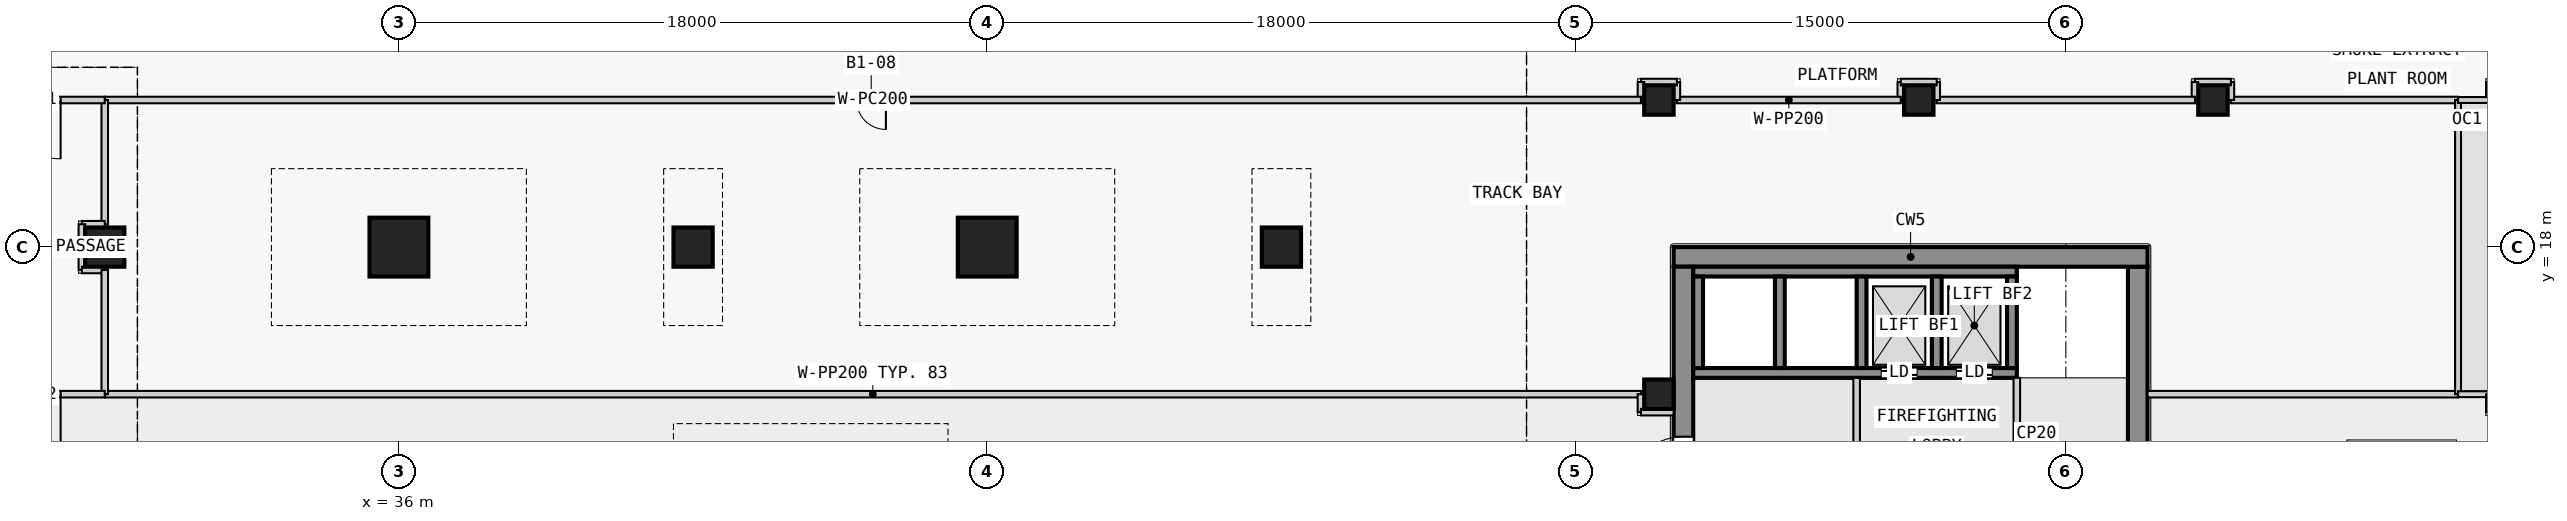
"""IFC4 building model, lengths in metres.
Left out: names, types, materials, properties, quantities, classifications, styles, units other than length and angle.
Written with IfcOpenShell. Run it as: python <this file> out.ifc"""

import sys

from ifc_helpers import new_model, si_unit, direction, frame, frame_2d, origin, origin_2d, place, context, subcontext, project, spatial, rectangle, extrude, element, fill, save


model = new_model("IFC4")
c1 = context("Model", 3, precision=1e-05, world=origin(), true_north=direction((0.0, 1.0)))
c2 = subcontext(c1, "Body", "Model", "MODEL_VIEW")
j1 = project(units=[si_unit("LENGTHUNIT", "METRE"), si_unit("PLANEANGLEUNIT", "RADIAN")], contexts=[c1])
p1 = place(None, origin())
s1 = spatial("IfcSite", under=j1, at=p1, CompositionType="ELEMENT")
p2 = place(p1, origin())
s2 = spatial("IfcBuilding", under=s1, at=p2, CompositionType="ELEMENT")
p3 = place(p2, frame((0.0, 0.0, -7.0)))
s3 = spatial("IfcBuildingStorey", under=s2, at=p3, CompositionType="ELEMENT", Elevation=-7.0)
p4 = place(p3, frame((27.0, 18.0, 0.0), z_axis=(0.0, 0.0, 1.0), x_axis=(1.0, 0.0, 0.0)))
e1 = element("IfcColumn", 1, at=p4, inside=s3, PredefinedType="COLUMN", context=c2, shape_type="SweptSolid", body=[
    extrude(rectangle(XDim=1.2, YDim=1.2, at=origin_2d()), origin(), (0.0, 0.0, 1.0), 7.0),
])
p5 = place(p3, frame((36.0, 18.0, 0.0), z_axis=(0.0, 0.0, 1.0), x_axis=(1.0, 0.0, 0.0)))
e2 = element("IfcColumn", 2, at=p5, inside=s3, PredefinedType="COLUMN", context=c2, shape_type="SweptSolid", body=[
    extrude(rectangle(XDim=1.8, YDim=1.8, at=origin_2d()), origin(), (0.0, 0.0, 1.0), 7.0),
])
p6 = place(p3, frame((45.0, 18.0, 0.0), z_axis=(0.0, 0.0, 1.0), x_axis=(1.0, 0.0, 0.0)))
e3 = element("IfcColumn", 3, at=p6, inside=s3, PredefinedType="COLUMN", context=c2, shape_type="SweptSolid", body=[
    extrude(rectangle(XDim=1.2, YDim=1.2, at=origin_2d()), origin(), (0.0, 0.0, 1.0), 7.0),
])
p7 = place(p3, frame((54.0, 18.0, 0.0), z_axis=(0.0, 0.0, 1.0), x_axis=(1.0, 0.0, 0.0)))
e4 = element("IfcColumn", 4, at=p7, inside=s3, PredefinedType="COLUMN", context=c2, shape_type="SweptSolid", body=[
    extrude(rectangle(XDim=1.8, YDim=1.8, at=origin_2d()), origin(), (0.0, 0.0, 1.0), 7.0),
])
p8 = place(p3, frame((63.0, 18.0, 0.0), z_axis=(0.0, 0.0, 1.0), x_axis=(1.0, 0.0, 0.0)))
e5 = element("IfcColumn", 5, at=p8, inside=s3, PredefinedType="COLUMN", context=c2, shape_type="SweptSolid", body=[
    extrude(rectangle(XDim=1.2, YDim=1.2, at=origin_2d()), origin(), (0.0, 0.0, 1.0), 7.0),
])
for number, where, z_axis, x_axis in (
    (6, (91.5, 22.5, 0.0), (0.0, 0.0, 1.0), (1.0, 0.0, 0.0)),
    (7, (82.5, 22.5, 0.0), (0.0, 0.0, 1.0), (1.0, 0.0, 0.0)),
    (8, (74.55, 22.5, 0.0), (0.0, 0.0, 1.0), (1.0, 0.0, 0.0)),
    (9, (74.55, 13.5, 0.0), (0.0, 0.0, 1.0), (1.0, 0.0, 0.0)),
):
    element("IfcColumn", number, at=place(p3, frame(where, z_axis=z_axis, x_axis=x_axis)), inside=s3, PredefinedType="COLUMN", context=c2, shape_type="SweptSolid", body=[
        extrude(rectangle(XDim=0.9, YDim=0.9, at=origin_2d()), origin(), (0.0, 0.0, 1.0), 7.0),
    ])
p9 = place(p3, frame((75.0, 17.7, 0.0), z_axis=(0.0, 0.0, 1.0), x_axis=(1.0, 0.0, 0.0)))
e10 = element("IfcWall", 10, at=p9, inside=s3, PredefinedType="SHEAR", context=c2, shape_type="SweptSolid", body=[
    extrude(rectangle(XDim=14.5, YDim=0.6, at=frame_2d((7.25, 0.0))), origin(), (0.0, 0.0, 1.0), 6.55),
])
p10 = place(p3, frame((75.3, 0.6, 0.0), z_axis=(0.0, 0.0, 1.0), x_axis=(0.0, 1.0, 0.0)))
e11 = element("IfcWall", 11, at=p10, inside=s3, PredefinedType="SHEAR", context=c2, shape_type="SweptSolid", body=[
    extrude(rectangle(XDim=16.8, YDim=0.6, at=frame_2d((8.4, 0.0))), origin(), (0.0, 0.0, 1.0), 6.55),
])
p11 = place(p10, frame((9.8, 0.0, 0.0)))
e12 = element("IfcOpeningElement", 12, at=p11, cuts=e11, PredefinedType="OPENING", context=c2, shape_type="SweptSolid", body=[
    extrude(rectangle(XDim=1.8, YDim=2.1, at=frame_2d((0.9, 1.05))), frame((0.0, 0.31, 0.0), z_axis=(0.0, -1.0, 0.0), x_axis=(1.0, 0.0, 0.0)), (0.0, 0.0, 1.0), 0.62),
])
p12 = place(p3, frame((89.2, 0.6, 0.0), z_axis=(0.0, 0.0, 1.0), x_axis=(0.0, 1.0, 0.0)))
e13 = element("IfcWall", 13, at=p12, inside=s3, PredefinedType="SHEAR", context=c2, shape_type="SweptSolid", body=[
    extrude(rectangle(XDim=16.8, YDim=0.6, at=frame_2d((8.4, 0.0))), origin(), (0.0, 0.0, 1.0), 6.55),
])
p13 = place(p3, frame((75.6, 17.25, 0.0), z_axis=(0.0, 0.0, 1.0), x_axis=(1.0, 0.0, 0.0)))
e14 = element("IfcWall", 14, at=p13, inside=s3, PredefinedType="SHEAR", context=c2, shape_type="SweptSolid", body=[
    extrude(rectangle(XDim=9.9, YDim=0.3, at=frame_2d((4.95, 0.0))), origin(), (0.0, 0.0, 1.0), 6.55),
])
p14 = place(p3, frame((75.6, 14.15, 0.0), z_axis=(0.0, 0.0, 1.0), x_axis=(1.0, 0.0, 0.0)))
e15 = element("IfcWall", 15, at=p14, inside=s3, PredefinedType="SHEAR", context=c2, shape_type="SweptSolid", body=[
    extrude(rectangle(XDim=9.9, YDim=0.3, at=frame_2d((4.95, 0.0))), origin(), (0.0, 0.0, 1.0), 6.55),
])
p15 = place(p14, frame((5.75, 0.0, 0.0)))
e16 = element("IfcOpeningElement", 16, at=p15, cuts=e15, PredefinedType="OPENING", context=c2, shape_type="SweptSolid", body=[
    extrude(rectangle(XDim=1.1, YDim=2.1, at=frame_2d((0.55, 1.05))), frame((0.0, 0.16, 0.0), z_axis=(0.0, -1.0, 0.0), x_axis=(1.0, 0.0, 0.0)), (0.0, 0.0, 1.0), 0.32),
])
p16 = place(p14, frame((8.05, 0.0, 0.0)))
e17 = element("IfcOpeningElement", 17, at=p16, cuts=e15, PredefinedType="OPENING", context=c2, shape_type="SweptSolid", body=[
    extrude(rectangle(XDim=1.1, YDim=2.1, at=frame_2d((0.55, 1.05))), frame((0.0, 0.16, 0.0), z_axis=(0.0, -1.0, 0.0), x_axis=(1.0, 0.0, 0.0)), (0.0, 0.0, 1.0), 0.32),
])
for number, where, z_axis, x_axis in (
    (18, (75.75, 14.3, 0.0), (0.0, 0.0, 1.0), (0.0, 1.0, 0.0)),
    (19, (78.25, 14.3, 0.0), (0.0, 0.0, 1.0), (0.0, 1.0, 0.0)),
    (20, (80.75, 14.3, 0.0), (0.0, 0.0, 1.0), (0.0, 1.0, 0.0)),
    (21, (83.05, 14.3, 0.0), (0.0, 0.0, 1.0), (0.0, 1.0, 0.0)),
    (22, (85.35, 14.3, 0.0), (0.0, 0.0, 1.0), (0.0, 1.0, 0.0)),
):
    element("IfcWall", number, at=place(p3, frame(where, z_axis=z_axis, x_axis=x_axis)), inside=s3, PredefinedType="SHEAR", context=c2, shape_type="SweptSolid", body=[
        extrude(rectangle(XDim=2.8, YDim=0.3, at=frame_2d((1.4, 0.0))), origin(), (0.0, 0.0, 1.0), 6.55),
    ])
for number, where, z_axis, x_axis in (
    (23, (80.6, 10.6, 0.0), (0.0, 0.0, 1.0), (0.0, 1.0, 0.0)),
    (24, (85.5, 10.6, 0.0), (0.0, 0.0, 1.0), (0.0, 1.0, 0.0)),
):
    element("IfcWall", number, at=place(p3, frame(where, z_axis=z_axis, x_axis=x_axis)), inside=s3, PredefinedType="PARTITIONING", context=c2, shape_type="SweptSolid", body=[
        extrude(rectangle(XDim=3.4, YDim=0.2, at=frame_2d((1.7, 0.0))), origin(), (0.0, 0.0, 1.0), 6.55),
    ])
p17 = place(p3, frame((81.95, 23.05, 0.0), z_axis=(0.0, 0.0, 1.0), x_axis=(0.0, -1.0, 0.0)))
e25 = element("IfcWall", 25, at=p17, inside=s3, PredefinedType="PARTITIONING", context=c2, shape_type="SweptSolid", body=[
    extrude(rectangle(XDim=0.55, YDim=0.2, at=frame_2d((0.275, 0.0))), origin(), (0.0, 0.0, 1.0), 6.55),
])
p18 = place(p3, frame((81.95, 22.5, 0.0), z_axis=(0.0, 0.0, 1.0), x_axis=(-1.0, 0.0, 0.0)))
e26 = element("IfcWall", 26, at=p18, inside=s3, PredefinedType="PARTITIONING", context=c2, shape_type="SweptSolid", body=[
    extrude(rectangle(XDim=6.85, YDim=0.2, at=frame_2d((3.425, 0.0))), origin(), (0.0, 0.0, 1.0), 6.55),
])
p19 = place(p3, frame((75.1, 22.5, 0.0), z_axis=(0.0, 0.0, 1.0), x_axis=(0.0, 1.0, 0.0)))
e27 = element("IfcWall", 27, at=p19, inside=s3, PredefinedType="PARTITIONING", context=c2, shape_type="SweptSolid", body=[
    extrude(rectangle(XDim=0.55, YDim=0.2, at=frame_2d((0.275, 0.0))), origin(), (0.0, 0.0, 1.0), 6.55),
])
p20 = place(p3, frame((75.1, 23.05, 0.0), z_axis=(0.0, 0.0, 1.0), x_axis=(-1.0, 0.0, 0.0)))
e28 = element("IfcWall", 28, at=p20, inside=s3, PredefinedType="PARTITIONING", context=c2, shape_type="SweptSolid", body=[
    extrude(rectangle(XDim=1.1, YDim=0.2, at=frame_2d((0.55, 0.0))), origin(), (0.0, 0.0, 1.0), 6.55),
])
p21 = place(p3, frame((74.0, 23.05, 0.0), z_axis=(0.0, 0.0, 1.0), x_axis=(0.0, -1.0, 0.0)))
e29 = element("IfcWall", 29, at=p21, inside=s3, PredefinedType="PARTITIONING", context=c2, shape_type="SweptSolid", body=[
    extrude(rectangle(XDim=0.55, YDim=0.2, at=frame_2d((0.275, 0.0))), origin(), (0.0, 0.0, 1.0), 6.55),
])
p22 = place(p3, frame((74.0, 22.5, 0.0), z_axis=(0.0, 0.0, 1.0), x_axis=(-1.0, 0.0, 0.0)))
e30 = element("IfcWall", 30, at=p22, inside=s3, PredefinedType="PARTITIONING", context=c2, shape_type="SweptSolid", body=[
    extrude(rectangle(XDim=47.0, YDim=0.2, at=frame_2d((23.5, 0.0))), origin(), (0.0, 0.0, 1.0), 6.55),
])
p23 = place(p22, frame((23.1, 0.0, 0.0)))
e31 = element("IfcOpeningElement", 31, at=p23, cuts=e30, PredefinedType="OPENING", context=c2, shape_type="SweptSolid", body=[
    extrude(rectangle(XDim=0.9, YDim=2.1, at=frame_2d((0.45, 1.05))), frame((0.0, 0.11, 0.0), z_axis=(0.0, -1.0, 0.0), x_axis=(1.0, 0.0, 0.0)), (0.0, 0.0, 1.0), 0.22),
])
p24 = place(p3, frame((27.0, 13.5, 0.0), z_axis=(0.0, 0.0, 1.0), x_axis=(1.0, 0.0, 0.0)))
e32 = element("IfcWall", 32, at=p24, inside=s3, PredefinedType="PARTITIONING", context=c2, shape_type="SweptSolid", body=[
    extrude(rectangle(XDim=47.0, YDim=0.2, at=frame_2d((23.5, 0.0))), origin(), (0.0, 0.0, 1.0), 6.55),
])
p25 = place(p3, frame((74.0, 13.5, 0.0), z_axis=(0.0, 0.0, 1.0), x_axis=(0.0, -1.0, 0.0)))
e33 = element("IfcWall", 33, at=p25, inside=s3, PredefinedType="PARTITIONING", context=c2, shape_type="SweptSolid", body=[
    extrude(rectangle(XDim=0.55, YDim=0.2, at=frame_2d((0.275, 0.0))), origin(), (0.0, 0.0, 1.0), 6.55),
])
p26 = place(p3, frame((74.0, 12.95, 0.0), z_axis=(0.0, 0.0, 1.0), x_axis=(1.0, 0.0, 0.0)))
e34 = element("IfcWall", 34, at=p26, inside=s3, PredefinedType="PARTITIONING", context=c2, shape_type="SweptSolid", body=[
    extrude(rectangle(XDim=1.0, YDim=0.2, at=frame_2d((0.5, 0.0))), origin(), (0.0, 0.0, 1.0), 6.55),
])
p27 = place(p3, frame((99.0, 22.5, 0.0), z_axis=(0.0, 0.0, 1.0), x_axis=(-1.0, 0.0, 0.0)))
e35 = element("IfcWall", 35, at=p27, inside=s3, PredefinedType="PARTITIONING", context=c2, shape_type="SweptSolid", body=[
    extrude(rectangle(XDim=6.95, YDim=0.2, at=frame_2d((3.475, 0.0))), origin(), (0.0, 0.0, 1.0), 6.55),
])
p28 = place(p3, frame((92.05, 22.5, 0.0), z_axis=(0.0, 0.0, 1.0), x_axis=(0.0, 1.0, 0.0)))
e36 = element("IfcWall", 36, at=p28, inside=s3, PredefinedType="PARTITIONING", context=c2, shape_type="SweptSolid", body=[
    extrude(rectangle(XDim=0.55, YDim=0.2, at=frame_2d((0.275, 0.0))), origin(), (0.0, 0.0, 1.0), 6.55),
])
p29 = place(p3, frame((92.05, 23.05, 0.0), z_axis=(0.0, 0.0, 1.0), x_axis=(-1.0, 0.0, 0.0)))
e37 = element("IfcWall", 37, at=p29, inside=s3, PredefinedType="PARTITIONING", context=c2, shape_type="SweptSolid", body=[
    extrude(rectangle(XDim=1.1, YDim=0.2, at=frame_2d((0.55, 0.0))), origin(), (0.0, 0.0, 1.0), 6.55),
])
p30 = place(p3, frame((90.95, 23.05, 0.0), z_axis=(0.0, 0.0, 1.0), x_axis=(0.0, -1.0, 0.0)))
e38 = element("IfcWall", 38, at=p30, inside=s3, PredefinedType="PARTITIONING", context=c2, shape_type="SweptSolid", body=[
    extrude(rectangle(XDim=0.55, YDim=0.2, at=frame_2d((0.275, 0.0))), origin(), (0.0, 0.0, 1.0), 6.55),
])
p31 = place(p3, frame((90.95, 22.5, 0.0), z_axis=(0.0, 0.0, 1.0), x_axis=(-1.0, 0.0, 0.0)))
e39 = element("IfcWall", 39, at=p31, inside=s3, PredefinedType="PARTITIONING", context=c2, shape_type="SweptSolid", body=[
    extrude(rectangle(XDim=7.9, YDim=0.2, at=frame_2d((3.95, 0.0))), origin(), (0.0, 0.0, 1.0), 6.55),
])
p32 = place(p3, frame((83.05, 22.5, 0.0), z_axis=(0.0, 0.0, 1.0), x_axis=(0.0, 1.0, 0.0)))
e40 = element("IfcWall", 40, at=p32, inside=s3, PredefinedType="PARTITIONING", context=c2, shape_type="SweptSolid", body=[
    extrude(rectangle(XDim=0.55, YDim=0.2, at=frame_2d((0.275, 0.0))), origin(), (0.0, 0.0, 1.0), 6.55),
])
p33 = place(p3, frame((83.05, 23.05, 0.0), z_axis=(0.0, 0.0, 1.0), x_axis=(-1.0, 0.0, 0.0)))
e41 = element("IfcWall", 41, at=p33, inside=s3, PredefinedType="PARTITIONING", context=c2, shape_type="SweptSolid", body=[
    extrude(rectangle(XDim=1.1, YDim=0.2, at=frame_2d((0.55, 0.0))), origin(), (0.0, 0.0, 1.0), 6.55),
])
p34 = place(p3, frame((27.0, 22.5, 0.0), z_axis=(0.0, 0.0, 1.0), x_axis=(0.0, -1.0, 0.0)))
e42 = element("IfcWall", 42, at=p34, inside=s3, PredefinedType="PARTITIONING", context=c2, shape_type="SweptSolid", body=[
    extrude(rectangle(XDim=3.8, YDim=0.2, at=frame_2d((1.9, 0.0))), origin(), (0.0, 0.0, 1.0), 6.55),
])
p35 = place(p3, frame((27.0, 18.7, 0.0), z_axis=(0.0, 0.0, 1.0), x_axis=(-1.0, 0.0, 0.0)))
e43 = element("IfcWall", 43, at=p35, inside=s3, PredefinedType="PARTITIONING", context=c2, shape_type="SweptSolid", body=[
    extrude(rectangle(XDim=0.7, YDim=0.2, at=frame_2d((0.35, 0.0))), origin(), (0.0, 0.0, 1.0), 6.55),
])
p36 = place(p3, frame((26.3, 18.7, 0.0), z_axis=(0.0, 0.0, 1.0), x_axis=(0.0, -1.0, 0.0)))
e44 = element("IfcWall", 44, at=p36, inside=s3, PredefinedType="PARTITIONING", context=c2, shape_type="SweptSolid", body=[
    extrude(rectangle(XDim=1.4, YDim=0.2, at=frame_2d((0.7, 0.0))), origin(), (0.0, 0.0, 1.0), 6.55),
])
p37 = place(p3, frame((26.3, 17.3, 0.0), z_axis=(0.0, 0.0, 1.0), x_axis=(1.0, 0.0, 0.0)))
e45 = element("IfcWall", 45, at=p37, inside=s3, PredefinedType="PARTITIONING", context=c2, shape_type="SweptSolid", body=[
    extrude(rectangle(XDim=0.7, YDim=0.2, at=frame_2d((0.35, 0.0))), origin(), (0.0, 0.0, 1.0), 6.55),
])
p38 = place(p3, frame((27.0, 17.3, 0.0), z_axis=(0.0, 0.0, 1.0), x_axis=(0.0, -1.0, 0.0)))
e46 = element("IfcWall", 46, at=p38, inside=s3, PredefinedType="PARTITIONING", context=c2, shape_type="SweptSolid", body=[
    extrude(rectangle(XDim=3.8, YDim=0.2, at=frame_2d((1.9, 0.0))), origin(), (0.0, 0.0, 1.0), 6.55),
])
p39 = place(p3, frame((89.5, 13.5, 0.0), z_axis=(0.0, 0.0, 1.0), x_axis=(1.0, 0.0, 0.0)))
e47 = element("IfcWall", 47, at=p39, inside=s3, PredefinedType="PARTITIONING", context=c2, shape_type="SweptSolid", body=[
    extrude(rectangle(XDim=9.5, YDim=0.2, at=frame_2d((4.75, 0.0))), origin(), (0.0, 0.0, 1.0), 6.55),
])
p40 = place(p3, frame((99.0, 22.5, 0.0), z_axis=(0.0, 0.0, 1.0), x_axis=(0.0, -1.0, 0.0)))
e48 = element("IfcWall", 48, at=p40, inside=s3, PredefinedType="PARTITIONING", context=c2, shape_type="SweptSolid", body=[
    extrude(rectangle(XDim=9.0, YDim=0.18, at=frame_2d((4.5, 0.0))), origin(), (0.0, 0.0, 1.0), 6.55),
])
p41 = place(p3, frame((99.95, 23.05, 0.0), z_axis=(0.0, 0.0, 1.0), x_axis=(0.0, -1.0, 0.0)))
e49 = element("IfcWall", 49, at=p41, inside=s3, PredefinedType="PARTITIONING", context=c2, shape_type="SweptSolid", body=[
    extrude(rectangle(XDim=0.55, YDim=0.18, at=frame_2d((0.275, 0.0))), origin(), (0.0, 0.0, 1.0), 6.55),
])
for number, where, z_axis, x_axis in (
    (50, (99.95, 22.5, 0.0), (0.0, 0.0, 1.0), (-1.0, 0.0, 0.0)),
    (51, (99.0, 13.5, 0.0), (0.0, 0.0, 1.0), (1.0, 0.0, 0.0)),
):
    element("IfcWall", number, at=place(p3, frame(where, z_axis=z_axis, x_axis=x_axis)), inside=s3, PredefinedType="PARTITIONING", context=c2, shape_type="SweptSolid", body=[
        extrude(rectangle(XDim=0.95, YDim=0.18, at=frame_2d((0.475, 0.0))), origin(), (0.0, 0.0, 1.0), 6.55),
    ])
p42 = place(p3, frame((99.95, 13.5, 0.0), z_axis=(0.0, 0.0, 1.0), x_axis=(0.0, -1.0, 0.0)))
e52 = element("IfcWall", 52, at=p42, inside=s3, PredefinedType="PARTITIONING", context=c2, shape_type="SweptSolid", body=[
    extrude(rectangle(XDim=0.55, YDim=0.18, at=frame_2d((0.275, 0.0))), origin(), (0.0, 0.0, 1.0), 6.55),
])
p43 = place(p3, frame((27.0, 22.5, 0.0), z_axis=(0.0, 0.0, 1.0), x_axis=(-1.0, 0.0, 0.0)))
e53 = element("IfcWall", 53, at=p43, inside=s3, PredefinedType="PARTITIONING", context=c2, shape_type="SweptSolid", body=[
    extrude(rectangle(XDim=4.5, YDim=0.2, at=frame_2d((2.25, 0.0))), origin(), (0.0, 0.0, 1.0), 6.55),
])
p44 = place(p43, frame((1.35, 0.0, 0.0)))
e54 = element("IfcOpeningElement", 54, at=p44, cuts=e53, PredefinedType="OPENING", context=c2, shape_type="SweptSolid", body=[
    extrude(rectangle(XDim=1.8, YDim=2.1, at=frame_2d((0.9, 1.05))), frame((0.0, 0.11, 0.0), z_axis=(0.0, -1.0, 0.0), x_axis=(1.0, 0.0, 0.0)), (0.0, 0.0, 1.0), 0.22),
])
p45 = place(p3, frame((27.0, 13.5, 0.0), z_axis=(0.0, 0.0, 1.0), x_axis=(-1.0, 0.0, 0.0)))
e55 = element("IfcWall", 55, at=p45, inside=s3, PredefinedType="PARTITIONING", context=c2, shape_type="SweptSolid", body=[
    extrude(rectangle(XDim=4.5, YDim=0.2, at=frame_2d((2.25, 0.0))), origin(), (0.0, 0.0, 1.0), 6.55),
])
p46 = place(p45, frame((1.35, 0.0, 0.0)))
e56 = element("IfcOpeningElement", 56, at=p46, cuts=e55, PredefinedType="OPENING", context=c2, shape_type="SweptSolid", body=[
    extrude(rectangle(XDim=1.8, YDim=2.1, at=frame_2d((0.9, 1.05))), frame((0.0, 0.11, 0.0), z_axis=(0.0, -1.0, 0.0), x_axis=(1.0, 0.0, 0.0)), (0.0, 0.0, 1.0), 0.22),
])
p47 = place(p15, origin())
e57 = element("IfcDoor", 57, at=p47, inside=s3, OperationType="DOUBLE_DOOR_SLIDING", PredefinedType="DOOR", context=c2, shape_type="SweptSolid", body=[
    extrude(rectangle(XDim=1.1, YDim=2.1, at=frame_2d((0.55, 1.05))), frame((0.0, 0.025, 0.0), z_axis=(0.0, -1.0, 0.0), x_axis=(1.0, 0.0, 0.0)), (0.0, 0.0, 1.0), 0.05),
])
fill(e16, e57)
p48 = place(p16, origin())
e58 = element("IfcDoor", 58, at=p48, inside=s3, OperationType="DOUBLE_DOOR_SLIDING", PredefinedType="DOOR", context=c2, shape_type="SweptSolid", body=[
    extrude(rectangle(XDim=1.1, YDim=2.1, at=frame_2d((0.55, 1.05))), frame((0.0, 0.025, 0.0), z_axis=(0.0, -1.0, 0.0), x_axis=(1.0, 0.0, 0.0)), (0.0, 0.0, 1.0), 0.05),
])
fill(e17, e58)
p49 = place(p11, origin())
e59 = element("IfcDoor", 59, at=p49, inside=s3, OperationType="DOUBLE_DOOR_SINGLE_SWING", PredefinedType="DOOR", context=c2, shape_type="SweptSolid", body=[
    extrude(rectangle(XDim=1.8, YDim=2.1, at=frame_2d((0.9, 1.05))), frame((0.0, 0.025, 0.0), z_axis=(0.0, -1.0, 0.0), x_axis=(1.0, 0.0, 0.0)), (0.0, 0.0, 1.0), 0.05),
])
fill(e12, e59)
p50 = place(p23, origin())
e60 = element("IfcDoor", 60, at=p50, inside=s3, OperationType="SINGLE_SWING_LEFT", PredefinedType="DOOR", context=c2, shape_type="SweptSolid", body=[
    extrude(rectangle(XDim=0.9, YDim=2.1, at=frame_2d((0.45, 1.05))), frame((0.0, 0.025, 0.0), z_axis=(0.0, -1.0, 0.0), x_axis=(1.0, 0.0, 0.0)), (0.0, 0.0, 1.0), 0.05),
])
fill(e31, e60)
p51 = place(p44, origin())
e61 = element("IfcDoor", 61, at=p51, inside=s3, OperationType="DOUBLE_DOOR_SINGLE_SWING", PredefinedType="DOOR", context=c2, shape_type="SweptSolid", body=[
    extrude(rectangle(XDim=1.8, YDim=2.1, at=frame_2d((0.9, 1.05))), frame((0.0, 0.025, 0.0), z_axis=(0.0, -1.0, 0.0), x_axis=(1.0, 0.0, 0.0)), (0.0, 0.0, 1.0), 0.05),
])
fill(e54, e61)
p52 = place(p46, origin())
e62 = element("IfcDoor", 62, at=p52, inside=s3, OperationType="DOUBLE_DOOR_SINGLE_SWING", PredefinedType="DOOR", context=c2, shape_type="SweptSolid", body=[
    extrude(rectangle(XDim=1.8, YDim=2.1, at=frame_2d((0.9, 1.05))), frame((0.0, 0.025, 0.0), z_axis=(0.0, -1.0, 0.0), x_axis=(1.0, 0.0, 0.0)), (0.0, 0.0, 1.0), 0.05),
])
fill(e56, e62)
save(model, sys.argv[1])
